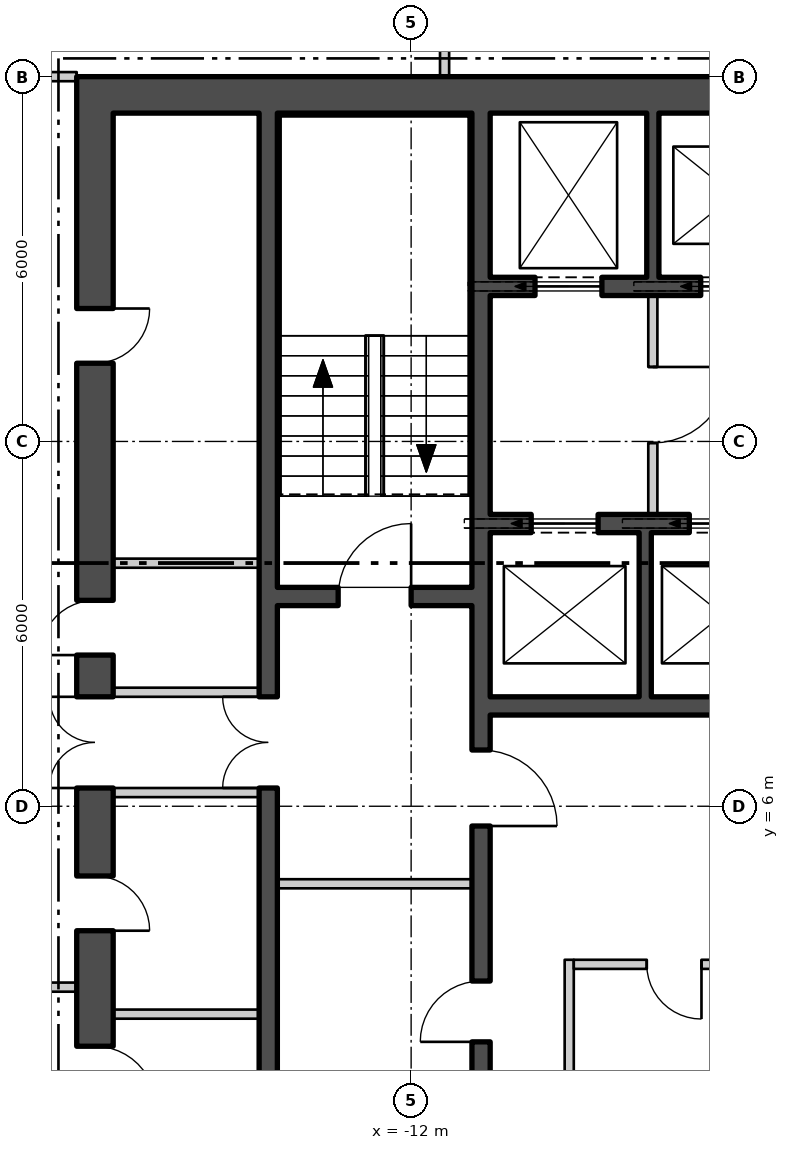
"""IFC4 building model, lengths in metres.
Left out: names, types, materials, properties, quantities, classifications, styles, units other than length and angle.
Written with IfcOpenShell. Run it as: python <this file> out.ifc"""

import sys

from ifc_helpers import new_model, si_unit, direction, frame, frame_2d, origin, place, context, subcontext, project, spatial, rectangle, extrude, element, fill, save


model = new_model("IFC4")
c1 = context("Model", 3, precision=1e-05, world=origin(), true_north=direction((0.0, 1.0)))
c2 = subcontext(c1, "Body", "Model", "MODEL_VIEW")
j1 = project(units=[si_unit("LENGTHUNIT", "METRE"), si_unit("PLANEANGLEUNIT", "RADIAN")], contexts=[c1])
p1 = place(None, origin())
s1 = spatial("IfcSite", under=j1, at=p1, CompositionType="ELEMENT")
p2 = place(p1, origin())
s2 = spatial("IfcBuilding", under=s1, at=p2, CompositionType="ELEMENT")
p3 = place(p2, frame((0.0, 0.0, 13.5)))
s3 = spatial("IfcBuildingStorey", under=s2, at=p3, CompositionType="ELEMENT", Elevation=13.5)
p4 = place(p3, frame((-17.5, 17.7, 0.0), z_axis=(0.0, 0.0, 1.0), x_axis=(1.0, 0.0, 0.0)))
e1 = element("IfcWall", 1, at=p4, inside=s3, PredefinedType="SHEAR", context=c2, shape_type="SweptSolid", body=[
    extrude(rectangle(XDim=35.0, YDim=0.6, at=frame_2d((17.5, 0.0))), origin(), (0.0, 0.0, 1.0), 4.88),
])
p5 = place(p3, frame((-17.2, 0.6, 0.0), z_axis=(0.0, 0.0, 1.0), x_axis=(0.0, 1.0, 0.0)))
e2 = element("IfcWall", 2, at=p5, inside=s3, PredefinedType="SHEAR", context=c2, shape_type="SweptSolid", body=[
    extrude(rectangle(XDim=16.8, YDim=0.6, at=frame_2d((8.4, 0.0))), origin(), (0.0, 0.0, 1.0), 4.88),
])
p6 = place(p5, frame((5.7, 0.0, 0.0)))
e3 = element("IfcOpeningElement", 3, at=p6, cuts=e2, PredefinedType="OPENING", context=c2, shape_type="SweptSolid", body=[
    extrude(rectangle(XDim=1.5, YDim=2.1, at=frame_2d((0.75, 1.05))), frame((0.0, 0.31, 0.0), z_axis=(0.0, -1.0, 0.0), x_axis=(1.0, 0.0, 0.0)), (0.0, 0.0, 1.0), 0.62),
])
p7 = place(p5, frame((0.453, 0.0, 0.0)))
e4 = element("IfcOpeningElement", 4, at=p7, cuts=e2, PredefinedType="OPENING", context=c2, shape_type="SweptSolid", body=[
    extrude(rectangle(XDim=1.0, YDim=2.1, at=frame_2d((0.5, 1.05))), frame((0.0, 0.31, 0.0), z_axis=(0.0, -1.0, 0.0), x_axis=(1.0, 0.0, 0.0)), (0.0, 0.0, 1.0), 0.62),
])
p8 = place(p5, frame((3.353, 0.0, 0.0)))
e5 = element("IfcOpeningElement", 5, at=p8, cuts=e2, PredefinedType="OPENING", context=c2, shape_type="SweptSolid", body=[
    extrude(rectangle(XDim=0.9, YDim=2.1, at=frame_2d((0.45, 1.05))), frame((0.0, 0.31, 0.0), z_axis=(0.0, -1.0, 0.0), x_axis=(1.0, 0.0, 0.0)), (0.0, 0.0, 1.0), 0.62),
])
p9 = place(p5, frame((7.886, 0.0, 0.0)))
e6 = element("IfcOpeningElement", 6, at=p9, cuts=e2, PredefinedType="OPENING", context=c2, shape_type="SweptSolid", body=[
    extrude(rectangle(XDim=0.9, YDim=2.1, at=frame_2d((0.45, 1.05))), frame((0.0, 0.31, 0.0), z_axis=(0.0, -1.0, 0.0), x_axis=(1.0, 0.0, 0.0)), (0.0, 0.0, 1.0), 0.62),
])
p10 = place(p5, frame((12.686, 0.0, 0.0)))
e7 = element("IfcOpeningElement", 7, at=p10, cuts=e2, PredefinedType="OPENING", context=c2, shape_type="SweptSolid", body=[
    extrude(rectangle(XDim=0.9, YDim=2.1, at=frame_2d((0.45, 1.05))), frame((0.0, 0.31, 0.0), z_axis=(0.0, -1.0, 0.0), x_axis=(1.0, 0.0, 0.0)), (0.0, 0.0, 1.0), 0.62),
])
p11 = place(p3, frame((-10.85, 0.6, 0.0), z_axis=(0.0, 0.0, 1.0), x_axis=(0.0, 1.0, 0.0)))
e8 = element("IfcWall", 8, at=p11, inside=s3, PredefinedType="SHEAR", context=c2, shape_type="SweptSolid", body=[
    extrude(rectangle(XDim=16.8, YDim=0.3, at=frame_2d((8.4, 0.0))), origin(), (0.0, 0.0, 1.0), 4.88),
])
p12 = place(p11, frame((5.075, 0.0, 0.0)))
e9 = element("IfcOpeningElement", 9, at=p12, cuts=e8, PredefinedType="OPENING", context=c2, shape_type="SweptSolid", body=[
    extrude(rectangle(XDim=1.25, YDim=2.1, at=frame_2d((0.625, 1.05))), frame((0.0, 0.16, 0.0), z_axis=(0.0, -1.0, 0.0), x_axis=(1.0, 0.0, 0.0)), (0.0, 0.0, 1.0), 0.32),
])
p13 = place(p11, frame((1.525, 0.0, 0.0)))
e10 = element("IfcOpeningElement", 10, at=p13, cuts=e8, PredefinedType="OPENING", context=c2, shape_type="SweptSolid", body=[
    extrude(rectangle(XDim=1.0, YDim=2.1, at=frame_2d((0.5, 1.05))), frame((0.0, 0.16, 0.0), z_axis=(0.0, -1.0, 0.0), x_axis=(1.0, 0.0, 0.0)), (0.0, 0.0, 1.0), 0.32),
])
p14 = place(p3, frame((-14.35, 0.6, 0.0), z_axis=(0.0, 0.0, 1.0), x_axis=(0.0, 1.0, 0.0)))
e11 = element("IfcWall", 11, at=p14, inside=s3, PredefinedType="SHEAR", context=c2, shape_type="SweptSolid", body=[
    extrude(rectangle(XDim=16.8, YDim=0.3, at=frame_2d((8.4, 0.0))), origin(), (0.0, 0.0, 1.0), 4.88),
])
p15 = place(p14, frame((5.7, 0.0, 0.0)))
e12 = element("IfcOpeningElement", 12, at=p15, cuts=e11, PredefinedType="OPENING", context=c2, shape_type="SweptSolid", body=[
    extrude(rectangle(XDim=1.5, YDim=2.1, at=frame_2d((0.75, 1.05))), frame((0.0, 0.16, 0.0), z_axis=(0.0, -1.0, 0.0), x_axis=(1.0, 0.0, 0.0)), (0.0, 0.0, 1.0), 0.32),
])
p16 = place(p3, frame((-14.2, 9.45, 0.0), z_axis=(0.0, 0.0, 1.0), x_axis=(1.0, 0.0, 0.0)))
e13 = element("IfcWall", 13, at=p16, inside=s3, PredefinedType="SHEAR", context=c2, shape_type="SweptSolid", body=[
    extrude(rectangle(XDim=3.2, YDim=0.3, at=frame_2d((1.6, 0.0))), origin(), (0.0, 0.0, 1.0), 4.88),
])
p17 = place(p16, frame((1.0, 0.0, 0.0)))
e14 = element("IfcOpeningElement", 14, at=p17, cuts=e13, PredefinedType="OPENING", context=c2, shape_type="SweptSolid", body=[
    extrude(rectangle(XDim=1.2, YDim=2.1, at=frame_2d((0.6, 1.05))), frame((0.0, 0.16, 0.0), z_axis=(0.0, -1.0, 0.0), x_axis=(1.0, 0.0, 0.0)), (0.0, 0.0, 1.0), 0.32),
])
p18 = place(p3, frame((-10.7, 14.55, 0.0), z_axis=(0.0, 0.0, 1.0), x_axis=(1.0, 0.0, 0.0)))
e15 = element("IfcWall", 15, at=p18, inside=s3, PredefinedType="SHEAR", context=c2, shape_type="SweptSolid", body=[
    extrude(rectangle(XDim=21.4, YDim=0.3, at=frame_2d((10.7, 0.0))), origin(), (0.0, 0.0, 1.0), 4.88),
])
p19 = place(p18, frame((0.738, 0.0, 0.0)))
e16 = element("IfcOpeningElement", 16, at=p19, cuts=e15, PredefinedType="OPENING", context=c2, shape_type="SweptSolid", body=[
    extrude(rectangle(XDim=1.1, YDim=2.1, at=frame_2d((0.55, 1.05))), frame((0.0, 0.16, 0.0), z_axis=(0.0, -1.0, 0.0), x_axis=(1.0, 0.0, 0.0)), (0.0, 0.0, 1.0), 0.32),
])
p20 = place(p18, frame((3.462, 0.0, 0.0)))
e17 = element("IfcOpeningElement", 17, at=p20, cuts=e15, PredefinedType="OPENING", context=c2, shape_type="SweptSolid", body=[
    extrude(rectangle(XDim=1.1, YDim=2.1, at=frame_2d((0.55, 1.05))), frame((0.0, 0.16, 0.0), z_axis=(0.0, -1.0, 0.0), x_axis=(1.0, 0.0, 0.0)), (0.0, 0.0, 1.0), 0.32),
])
p21 = place(p18, frame((6.138, 0.0, 0.0)))
e18 = element("IfcOpeningElement", 18, at=p21, cuts=e15, PredefinedType="OPENING", context=c2, shape_type="SweptSolid", body=[
    extrude(rectangle(XDim=1.1, YDim=2.1, at=frame_2d((0.55, 1.05))), frame((0.0, 0.16, 0.0), z_axis=(0.0, -1.0, 0.0), x_axis=(1.0, 0.0, 0.0)), (0.0, 0.0, 1.0), 0.32),
])
p22 = place(p18, frame((8.812, 0.0, 0.0)))
e19 = element("IfcOpeningElement", 19, at=p22, cuts=e15, PredefinedType="OPENING", context=c2, shape_type="SweptSolid", body=[
    extrude(rectangle(XDim=1.1, YDim=2.1, at=frame_2d((0.55, 1.05))), frame((0.0, 0.16, 0.0), z_axis=(0.0, -1.0, 0.0), x_axis=(1.0, 0.0, 0.0)), (0.0, 0.0, 1.0), 0.32),
])
p23 = place(p18, frame((14.162, 0.0, 0.0)))
e20 = element("IfcOpeningElement", 20, at=p23, cuts=e15, PredefinedType="OPENING", context=c2, shape_type="SweptSolid", body=[
    extrude(rectangle(XDim=1.1, YDim=2.1, at=frame_2d((0.55, 1.05))), frame((0.0, 0.16, 0.0), z_axis=(0.0, -1.0, 0.0), x_axis=(1.0, 0.0, 0.0)), (0.0, 0.0, 1.0), 0.32),
])
p24 = place(p18, frame((16.837, 0.0, 0.0)))
e21 = element("IfcOpeningElement", 21, at=p24, cuts=e15, PredefinedType="OPENING", context=c2, shape_type="SweptSolid", body=[
    extrude(rectangle(XDim=1.1, YDim=2.1, at=frame_2d((0.55, 1.05))), frame((0.0, 0.16, 0.0), z_axis=(0.0, -1.0, 0.0), x_axis=(1.0, 0.0, 0.0)), (0.0, 0.0, 1.0), 0.32),
])
p25 = place(p18, frame((19.562, 0.0, 0.0)))
e22 = element("IfcOpeningElement", 22, at=p25, cuts=e15, PredefinedType="OPENING", context=c2, shape_type="SweptSolid", body=[
    extrude(rectangle(XDim=1.1, YDim=2.1, at=frame_2d((0.55, 1.05))), frame((0.0, 0.16, 0.0), z_axis=(0.0, -1.0, 0.0), x_axis=(1.0, 0.0, 0.0)), (0.0, 0.0, 1.0), 0.32),
])
p26 = place(p3, frame((-10.7, 10.65, 0.0), z_axis=(0.0, 0.0, 1.0), x_axis=(1.0, 0.0, 0.0)))
e23 = element("IfcWall", 23, at=p26, inside=s3, PredefinedType="SHEAR", context=c2, shape_type="SweptSolid", body=[
    extrude(rectangle(XDim=10.3, YDim=0.3, at=frame_2d((5.15, 0.0))), origin(), (0.0, 0.0, 1.0), 4.88),
])
p27 = place(p26, frame((0.675, 0.0, 0.0)))
e24 = element("IfcOpeningElement", 24, at=p27, cuts=e23, PredefinedType="OPENING", context=c2, shape_type="SweptSolid", body=[
    extrude(rectangle(XDim=1.1, YDim=2.1, at=frame_2d((0.55, 1.05))), frame((0.0, 0.16, 0.0), z_axis=(0.0, -1.0, 0.0), x_axis=(1.0, 0.0, 0.0)), (0.0, 0.0, 1.0), 0.32),
])
p28 = place(p26, frame((3.275, 0.0, 0.0)))
e25 = element("IfcOpeningElement", 25, at=p28, cuts=e23, PredefinedType="OPENING", context=c2, shape_type="SweptSolid", body=[
    extrude(rectangle(XDim=1.1, YDim=2.1, at=frame_2d((0.55, 1.05))), frame((0.0, 0.16, 0.0), z_axis=(0.0, -1.0, 0.0), x_axis=(1.0, 0.0, 0.0)), (0.0, 0.0, 1.0), 0.32),
])
p29 = place(p26, frame((5.825, 0.0, 0.0)))
e26 = element("IfcOpeningElement", 26, at=p29, cuts=e23, PredefinedType="OPENING", context=c2, shape_type="SweptSolid", body=[
    extrude(rectangle(XDim=1.1, YDim=2.1, at=frame_2d((0.55, 1.05))), frame((0.0, 0.16, 0.0), z_axis=(0.0, -1.0, 0.0), x_axis=(1.0, 0.0, 0.0)), (0.0, 0.0, 1.0), 0.32),
])
p30 = place(p26, frame((8.375, 0.0, 0.0)))
e27 = element("IfcOpeningElement", 27, at=p30, cuts=e23, PredefinedType="OPENING", context=c2, shape_type="SweptSolid", body=[
    extrude(rectangle(XDim=1.1, YDim=2.1, at=frame_2d((0.55, 1.05))), frame((0.0, 0.16, 0.0), z_axis=(0.0, -1.0, 0.0), x_axis=(1.0, 0.0, 0.0)), (0.0, 0.0, 1.0), 0.32),
])
p31 = place(p3, frame((-10.7, 7.65, 0.0), z_axis=(0.0, 0.0, 1.0), x_axis=(1.0, 0.0, 0.0)))
e28 = element("IfcWall", 28, at=p31, inside=s3, PredefinedType="SHEAR", context=c2, shape_type="SweptSolid", body=[
    extrude(rectangle(XDim=10.3, YDim=0.3, at=frame_2d((5.15, 0.0))), origin(), (0.0, 0.0, 1.0), 4.88),
])
for number, where, z_axis, x_axis in (
    (29, (-8.025, 14.7, 0.0), (0.0, 0.0, 1.0), (0.0, 1.0, 0.0)),
    (30, (-8.15, 7.8, 0.0), (0.0, 0.0, 1.0), (0.0, 1.0, 0.0)),
):
    element("IfcWall", number, at=place(p3, frame(where, z_axis=z_axis, x_axis=x_axis)), inside=s3, PredefinedType="SHEAR", context=c2, shape_type="SweptSolid", body=[
        extrude(rectangle(XDim=2.7, YDim=0.2, at=frame_2d((1.35, 0.0))), origin(), (0.0, 0.0, 1.0), 4.88),
    ])
p32 = place(p3, frame((-8.025, 10.8, 0.0), z_axis=(0.0, 0.0, 1.0), x_axis=(0.0, 1.0, 0.0)))
e31 = element("IfcWall", 31, at=p32, inside=s3, PredefinedType="PARTITIONING", context=c2, shape_type="SweptSolid", body=[
    extrude(rectangle(XDim=3.6, YDim=0.15, at=frame_2d((1.8, 0.0))), origin(), (0.0, 0.0, 1.0), 4.88),
])
p33 = place(p32, frame((1.175, 0.0, 0.0)))
e32 = element("IfcOpeningElement", 32, at=p33, cuts=e31, PredefinedType="OPENING", context=c2, shape_type="SweptSolid", body=[
    extrude(rectangle(XDim=1.25, YDim=2.1, at=frame_2d((0.625, 1.05))), frame((0.0, 0.085, 0.0), z_axis=(0.0, -1.0, 0.0), x_axis=(1.0, 0.0, 0.0)), (0.0, 0.0, 1.0), 0.17),
])
p34 = place(p3, frame((-14.2, 4.725, 0.0), z_axis=(0.0, 0.0, 1.0), x_axis=(1.0, 0.0, 0.0)))
e33 = element("IfcWall", 33, at=p34, inside=s3, PredefinedType="PARTITIONING", context=c2, shape_type="SweptSolid", body=[
    extrude(rectangle(XDim=3.2, YDim=0.15, at=frame_2d((1.6, 0.0))), origin(), (0.0, 0.0, 1.0), 4.88),
])
for number, where, z_axis, x_axis in (
    (34, (-16.9, 6.225, 0.0), (0.0, 0.0, 1.0), (1.0, 0.0, 0.0)),
    (35, (-16.9, 7.875, 0.0), (0.0, 0.0, 1.0), (1.0, 0.0, 0.0)),
    (36, (-16.9, 2.581, 0.0), (0.0, 0.0, 1.0), (1.0, 0.0, 0.0)),
    (37, (-16.9, 9.998, 0.0), (0.0, 0.0, 1.0), (1.0, 0.0, 0.0)),
):
    element("IfcWall", number, at=place(p3, frame(where, z_axis=z_axis, x_axis=x_axis)), inside=s3, PredefinedType="PARTITIONING", context=c2, shape_type="SweptSolid", body=[
        extrude(rectangle(XDim=2.4, YDim=0.15, at=frame_2d((1.2, 0.0))), origin(), (0.0, 0.0, 1.0), 4.88),
    ])
p35 = place(p3, frame((-9.4, 0.6, 0.0), z_axis=(0.0, 0.0, 1.0), x_axis=(0.0, 1.0, 0.0)))
e38 = element("IfcWall", 38, at=p35, inside=s3, PredefinedType="PARTITIONING", context=c2, shape_type="SweptSolid", body=[
    extrude(rectangle(XDim=2.875, YDim=0.15, at=frame_2d((1.438, 0.0))), origin(), (0.0, 0.0, 1.0), 4.88),
])
p36 = place(p3, frame((-9.325, 3.4, 0.0), z_axis=(0.0, 0.0, 1.0), x_axis=(1.0, 0.0, 0.0)))
e39 = element("IfcWall", 39, at=p36, inside=s3, PredefinedType="PARTITIONING", context=c2, shape_type="SweptSolid", body=[
    extrude(rectangle(XDim=3.3, YDim=0.15, at=frame_2d((1.65, 0.0))), origin(), (0.0, 0.0, 1.0), 4.88),
])
p37 = place(p36, frame((1.2, 0.0, 0.0)))
e40 = element("IfcOpeningElement", 40, at=p37, cuts=e39, PredefinedType="OPENING", context=c2, shape_type="SweptSolid", body=[
    extrude(rectangle(XDim=0.9, YDim=2.1, at=frame_2d((0.45, 1.05))), frame((0.0, 0.085, 0.0), z_axis=(0.0, -1.0, 0.0), x_axis=(1.0, 0.0, 0.0)), (0.0, 0.0, 1.0), 0.17),
])
p38 = place(p3, frame((-19.975, 18.0, 0.0), z_axis=(0.0, 0.0, 1.0), x_axis=(1.0, 0.0, 0.0)))
e41 = element("IfcWall", 41, at=p38, inside=s3, PredefinedType="PARTITIONING", context=c2, shape_type="SweptSolid", body=[
    extrude(rectangle(XDim=2.475, YDim=0.15, at=frame_2d((1.238, 0.0))), origin(), (0.0, 0.0, 1.0), 4.33),
])
p39 = place(p3, frame((-19.825, 3.025, 0.0), z_axis=(0.0, 0.0, 1.0), x_axis=(1.0, 0.0, 0.0)))
e42 = element("IfcWall", 42, at=p39, inside=s3, PredefinedType="PARTITIONING", context=c2, shape_type="SweptSolid", body=[
    extrude(rectangle(XDim=2.325, YDim=0.15, at=frame_2d((1.163, 0.0))), origin(), (0.0, 0.0, 1.0), 4.33),
])
p40 = place(p39, frame((0.662, 0.0, 0.0)))
e43 = element("IfcOpeningElement", 43, at=p40, cuts=e42, PredefinedType="OPENING", context=c2, shape_type="SweptSolid", body=[
    extrude(rectangle(XDim=1.0, YDim=2.1, at=frame_2d((0.5, 1.05))), frame((0.0, 0.085, 0.0), z_axis=(0.0, -1.0, 0.0), x_axis=(1.0, 0.0, 0.0)), (0.0, 0.0, 1.0), 0.17),
])
p41 = place(p3, frame((-11.45, 18.0, 0.0), z_axis=(0.0, 0.0, 1.0), x_axis=(0.0, 1.0, 0.0)))
e44 = element("IfcWall", 44, at=p41, inside=s3, PredefinedType="PARTITIONING", context=c2, shape_type="SweptSolid", body=[
    extrude(rectangle(XDim=1.75, YDim=0.15, at=frame_2d((0.875, 0.0))), origin(), (0.0, 0.0, 1.0), 4.88),
])
p42 = place(p19, origin())
e45 = element("IfcDoor", 45, at=p42, inside=s3, OperationType="SLIDING_TO_LEFT", PredefinedType="DOOR", context=c2, shape_type="SweptSolid", body=[
    extrude(rectangle(XDim=1.1, YDim=2.1, at=frame_2d((0.55, 1.05))), frame((0.0, 0.025, 0.0), z_axis=(0.0, -1.0, 0.0), x_axis=(1.0, 0.0, 0.0)), (0.0, 0.0, 1.0), 0.05),
])
fill(e16, e45)
p43 = place(p20, origin())
e46 = element("IfcDoor", 46, at=p43, inside=s3, OperationType="SLIDING_TO_LEFT", PredefinedType="DOOR", context=c2, shape_type="SweptSolid", body=[
    extrude(rectangle(XDim=1.1, YDim=2.1, at=frame_2d((0.55, 1.05))), frame((0.0, 0.025, 0.0), z_axis=(0.0, -1.0, 0.0), x_axis=(1.0, 0.0, 0.0)), (0.0, 0.0, 1.0), 0.05),
])
fill(e17, e46)
p44 = place(p27, origin())
e47 = element("IfcDoor", 47, at=p44, inside=s3, OperationType="SLIDING_TO_LEFT", PredefinedType="DOOR", context=c2, shape_type="SweptSolid", body=[
    extrude(rectangle(XDim=1.1, YDim=2.1, at=frame_2d((0.55, 1.05))), frame((0.0, 0.025, 0.0), z_axis=(0.0, -1.0, 0.0), x_axis=(1.0, 0.0, 0.0)), (0.0, 0.0, 1.0), 0.05),
])
fill(e24, e47)
p45 = place(p28, origin())
e48 = element("IfcDoor", 48, at=p45, inside=s3, OperationType="SLIDING_TO_LEFT", PredefinedType="DOOR", context=c2, shape_type="SweptSolid", body=[
    extrude(rectangle(XDim=1.1, YDim=2.1, at=frame_2d((0.55, 1.05))), frame((0.0, 0.025, 0.0), z_axis=(0.0, -1.0, 0.0), x_axis=(1.0, 0.0, 0.0)), (0.0, 0.0, 1.0), 0.05),
])
fill(e25, e48)
p46 = place(p33, origin())
e49 = element("IfcDoor", 49, at=p46, inside=s3, OperationType="SINGLE_SWING_RIGHT", PredefinedType="DOOR", context=c2, shape_type="SweptSolid", body=[
    extrude(rectangle(XDim=1.25, YDim=2.1, at=frame_2d((0.625, 1.05))), frame((0.0, 0.025, 0.0), z_axis=(0.0, -1.0, 0.0), x_axis=(1.0, 0.0, 0.0)), (0.0, 0.0, 1.0), 0.05),
])
fill(e32, e49)
p47 = place(p17, origin())
e50 = element("IfcDoor", 50, at=p47, inside=s3, OperationType="SINGLE_SWING_LEFT", PredefinedType="DOOR", context=c2, shape_type="SweptSolid", body=[
    extrude(rectangle(XDim=1.2, YDim=2.1, at=frame_2d((0.6, 1.05))), frame((0.0, 0.025, 0.0), z_axis=(0.0, -1.0, 0.0), x_axis=(1.0, 0.0, 0.0)), (0.0, 0.0, 1.0), 0.05),
])
fill(e14, e50)
p48 = place(p12, origin())
e51 = element("IfcDoor", 51, at=p48, inside=s3, OperationType="SINGLE_SWING_LEFT", PredefinedType="DOOR", context=c2, shape_type="SweptSolid", body=[
    extrude(rectangle(XDim=1.25, YDim=2.1, at=frame_2d((0.625, 1.05))), frame((0.0, 0.025, 0.0), z_axis=(0.0, -1.0, 0.0), x_axis=(1.0, 0.0, 0.0)), (0.0, 0.0, 1.0), 0.05),
])
fill(e9, e51)
p49 = place(p13, origin())
e52 = element("IfcDoor", 52, at=p49, inside=s3, OperationType="SINGLE_SWING_RIGHT", PredefinedType="DOOR", context=c2, shape_type="SweptSolid", body=[
    extrude(rectangle(XDim=1.0, YDim=2.1, at=frame_2d((0.5, 1.05))), frame((0.0, 0.025, 0.0), z_axis=(0.0, -1.0, 0.0), x_axis=(1.0, 0.0, 0.0)), (0.0, 0.0, 1.0), 0.05),
])
fill(e10, e52)
p50 = place(p15, origin())
e53 = element("IfcDoor", 53, at=p50, inside=s3, OperationType="DOUBLE_DOOR_SINGLE_SWING", PredefinedType="DOOR", context=c2, shape_type="SweptSolid", body=[
    extrude(rectangle(XDim=1.5, YDim=2.1, at=frame_2d((0.75, 1.05))), frame((0.0, 0.025, 0.0), z_axis=(0.0, -1.0, 0.0), x_axis=(1.0, 0.0, 0.0)), (0.0, 0.0, 1.0), 0.05),
])
fill(e12, e53)
p51 = place(p6, origin())
e54 = element("IfcDoor", 54, at=p51, inside=s3, OperationType="DOUBLE_DOOR_SINGLE_SWING", PredefinedType="DOOR", context=c2, shape_type="SweptSolid", body=[
    extrude(rectangle(XDim=1.5, YDim=2.1, at=frame_2d((0.75, 1.05))), frame((0.0, 0.025, 0.0), z_axis=(0.0, -1.0, 0.0), x_axis=(1.0, 0.0, 0.0)), (0.0, 0.0, 1.0), 0.05),
])
fill(e3, e54)
p52 = place(p7, origin())
e55 = element("IfcDoor", 55, at=p52, inside=s3, OperationType="SINGLE_SWING_LEFT", PredefinedType="DOOR", context=c2, shape_type="SweptSolid", body=[
    extrude(rectangle(XDim=1.0, YDim=2.1, at=frame_2d((0.5, 1.05))), frame((0.0, 0.025, 0.0), z_axis=(0.0, -1.0, 0.0), x_axis=(1.0, 0.0, 0.0)), (0.0, 0.0, 1.0), 0.05),
])
fill(e4, e55)
p53 = place(p8, origin())
e56 = element("IfcDoor", 56, at=p53, inside=s3, OperationType="SINGLE_SWING_LEFT", PredefinedType="DOOR", context=c2, shape_type="SweptSolid", body=[
    extrude(rectangle(XDim=0.9, YDim=2.1, at=frame_2d((0.45, 1.05))), frame((0.0, 0.025, 0.0), z_axis=(0.0, -1.0, 0.0), x_axis=(1.0, 0.0, 0.0)), (0.0, 0.0, 1.0), 0.05),
])
fill(e5, e56)
p54 = place(p9, origin())
e57 = element("IfcDoor", 57, at=p54, inside=s3, OperationType="SINGLE_SWING_RIGHT", PredefinedType="DOOR", context=c2, shape_type="SweptSolid", body=[
    extrude(rectangle(XDim=0.9, YDim=2.1, at=frame_2d((0.45, 1.05))), frame((0.0, 0.025, 0.0), z_axis=(0.0, -1.0, 0.0), x_axis=(1.0, 0.0, 0.0)), (0.0, 0.0, 1.0), 0.05),
])
fill(e6, e57)
p55 = place(p10, origin())
e58 = element("IfcDoor", 58, at=p55, inside=s3, OperationType="SINGLE_SWING_RIGHT", PredefinedType="DOOR", context=c2, shape_type="SweptSolid", body=[
    extrude(rectangle(XDim=0.9, YDim=2.1, at=frame_2d((0.45, 1.05))), frame((0.0, 0.025, 0.0), z_axis=(0.0, -1.0, 0.0), x_axis=(1.0, 0.0, 0.0)), (0.0, 0.0, 1.0), 0.05),
])
fill(e7, e58)
p56 = place(p37, origin())
e59 = element("IfcDoor", 59, at=p56, inside=s3, OperationType="SINGLE_SWING_RIGHT", PredefinedType="DOOR", context=c2, shape_type="SweptSolid", body=[
    extrude(rectangle(XDim=0.9, YDim=2.1, at=frame_2d((0.45, 1.05))), frame((0.0, 0.025, 0.0), z_axis=(0.0, -1.0, 0.0), x_axis=(1.0, 0.0, 0.0)), (0.0, 0.0, 1.0), 0.05),
])
fill(e40, e59)
save(model, sys.argv[1])
